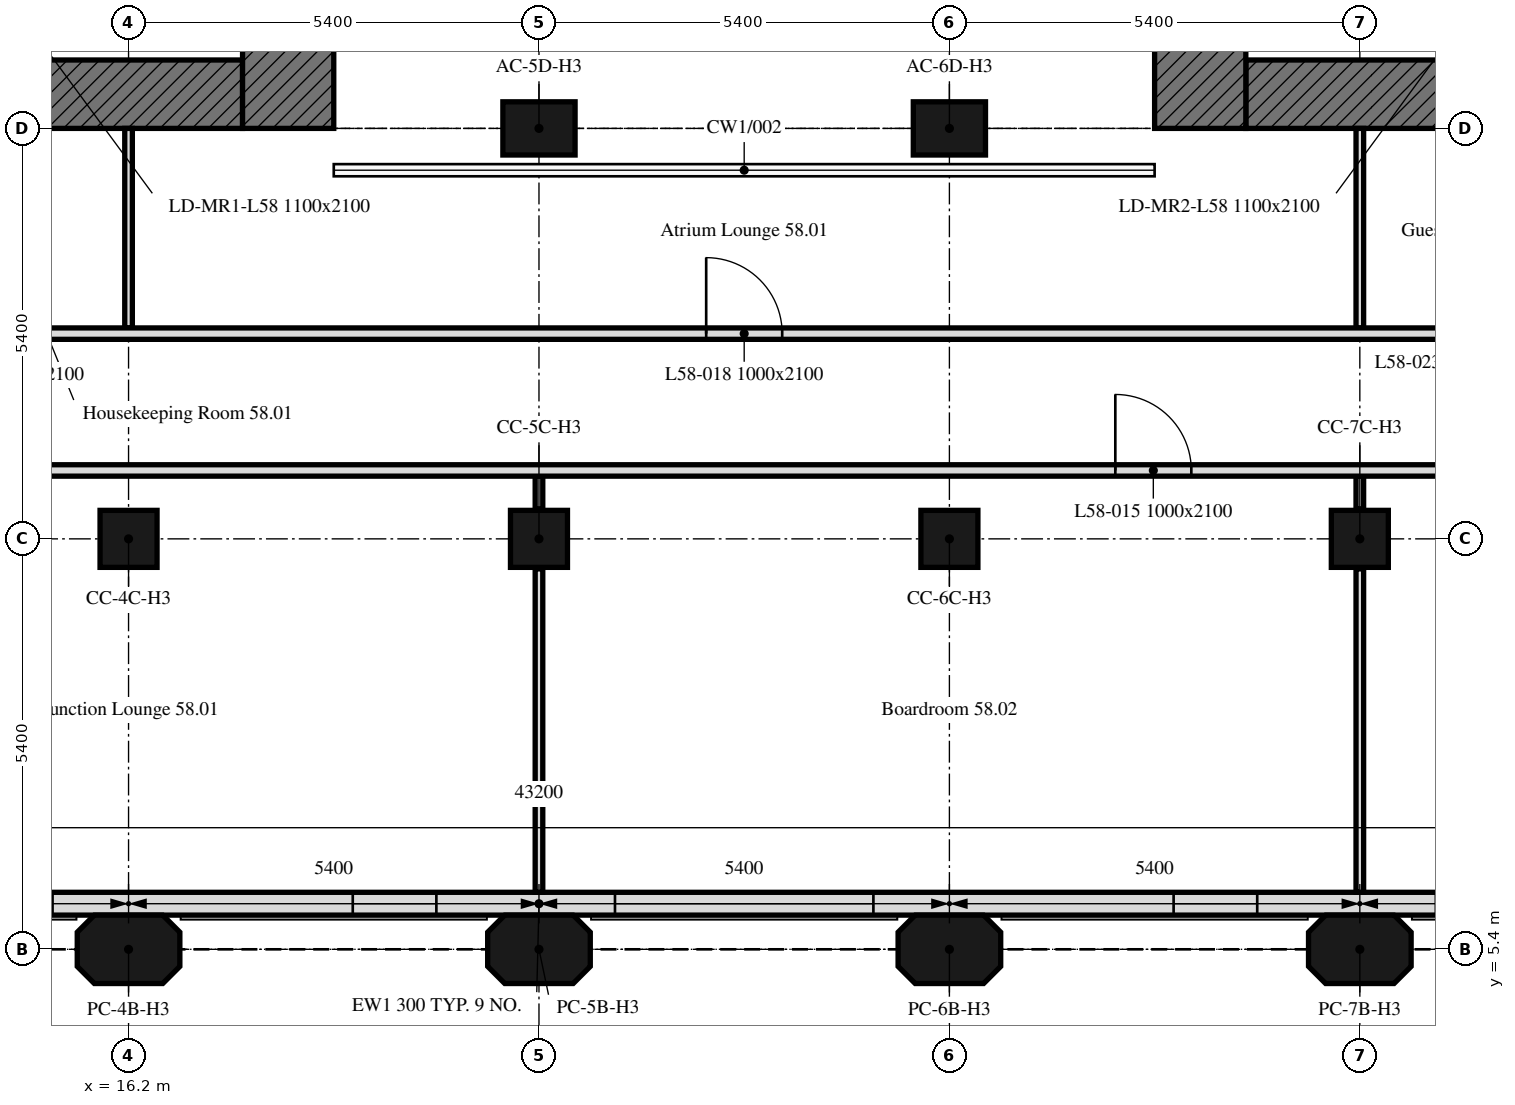
"""IFC4 building model, lengths in metres.
Left out: names, types, materials, properties, quantities, classifications, styles, units other than length and angle.
Written with IfcOpenShell. Run it as: python <this file> out.ifc"""

import sys

from ifc_helpers import new_model, si_unit, direction, frame, frame_2d, origin, origin_2d, place, context, subcontext, project, spatial, polyline, rectangle, outline, extrude, element, fill, save


model = new_model("IFC4")
c1 = context("Model", 3, precision=1e-05, world=origin(), true_north=direction((0.0, 1.0)))
c2 = subcontext(c1, "Body", "Model", "MODEL_VIEW")
j1 = project(units=[si_unit("LENGTHUNIT", "METRE"), si_unit("PLANEANGLEUNIT", "RADIAN")], contexts=[c1])
p1 = place(None, origin())
s1 = spatial("IfcSite", under=j1, at=p1, CompositionType="ELEMENT")
p2 = place(p1, origin())
s2 = spatial("IfcBuilding", under=s1, at=p2, CompositionType="ELEMENT")
p3 = place(p2, frame((0.0, 0.0, 230.2)))
s3 = spatial("IfcBuildingStorey", under=s2, at=p3, CompositionType="ELEMENT", Elevation=230.2)
for number, where, z_axis, x_axis in (
    (1, (16.2, 5.4, 0.0), (0.0, 0.0, 1.0), (1.0, 0.0, 0.0)),
    (2, (21.6, 5.4, 0.0), (0.0, 0.0, 1.0), (1.0, 0.0, 0.0)),
    (3, (27.0, 5.4, 0.0), (0.0, 0.0, 1.0), (1.0, 0.0, 0.0)),
    (4, (32.4, 5.4, 0.0), (0.0, 0.0, 1.0), (1.0, 0.0, 0.0)),
):
    element("IfcColumn", number, at=place(p3, frame(where, z_axis=z_axis, x_axis=x_axis)), inside=s3, PredefinedType="COLUMN", context=c2, shape_type="SweptSolid", body=[
        extrude(outline(polyline([(-0.45, -0.45), (0.45, -0.45), (0.675, -0.225), (0.675, 0.225), (0.45, 0.45), (-0.45, 0.45), (-0.675, 0.225), (-0.675, -0.225), (-0.45, -0.45)])), origin(), (0.0, 0.0, 1.0), 2.8),
    ])
for number, where, z_axis, x_axis in (
    (5, (16.2, 10.8, 0.0), (0.0, 0.0, 1.0), (1.0, 0.0, 0.0)),
    (6, (21.6, 10.8, 0.0), (0.0, 0.0, 1.0), (1.0, 0.0, 0.0)),
    (7, (27.0, 10.8, 0.0), (0.0, 0.0, 1.0), (1.0, 0.0, 0.0)),
    (8, (32.4, 10.8, 0.0), (0.0, 0.0, 1.0), (1.0, 0.0, 0.0)),
):
    element("IfcColumn", number, at=place(p3, frame(where, z_axis=z_axis, x_axis=x_axis)), inside=s3, PredefinedType="COLUMN", context=c2, shape_type="SweptSolid", body=[
        extrude(rectangle(XDim=0.75, YDim=0.75, at=origin_2d()), origin(), (0.0, 0.0, 1.0), 2.8),
    ])
for number, where, z_axis, x_axis in (
    (9, (21.6, 16.2, 0.0), (0.0, 0.0, 1.0), (1.0, 0.0, 0.0)),
    (10, (27.0, 16.2, 0.0), (0.0, 0.0, 1.0), (1.0, 0.0, 0.0)),
):
    element("IfcColumn", number, at=place(p3, frame(where, z_axis=z_axis, x_axis=x_axis)), inside=s3, PredefinedType="COLUMN", context=c2, shape_type="SweptSolid", body=[
        extrude(rectangle(XDim=0.95, YDim=0.7, at=origin_2d()), origin(), (0.0, 0.0, 1.0), 2.8),
    ])
p4 = place(p3, frame((5.586, 6.0, 0.0), z_axis=(0.0, 0.0, 1.0), x_axis=(1.0, 0.0, 0.0)))
e11 = element("IfcWall", 11, at=p4, inside=s3, PredefinedType="SOLIDWALL", context=c2, shape_type="SweptSolid", body=[
    extrude(rectangle(XDim=32.027, YDim=0.3, at=frame_2d((16.014, 0.0))), origin(), (0.0, 0.0, 1.0), 2.8),
])
p5 = place(p4, frame((2.764, 0.0, 0.9)))
e12 = element("IfcOpeningElement", 12, at=p5, cuts=e11, PredefinedType="OPENING", context=c2, shape_type="SweptSolid", body=[
    extrude(rectangle(XDim=1.1, YDim=1.7, at=frame_2d((0.55, 0.85))), frame((0.0, 0.16, 0.0), z_axis=(0.0, -1.0, 0.0), x_axis=(1.0, 0.0, 0.0)), (0.0, 0.0, 1.0), 0.32),
])
p6 = place(p4, frame((6.214, 0.0, 0.9)))
e13 = element("IfcOpeningElement", 13, at=p6, cuts=e11, PredefinedType="OPENING", context=c2, shape_type="SweptSolid", body=[
    extrude(rectangle(XDim=3.4, YDim=1.7, at=frame_2d((1.7, 0.85))), frame((0.0, 0.16, 0.0), z_axis=(0.0, -1.0, 0.0), x_axis=(1.0, 0.0, 0.0)), (0.0, 0.0, 1.0), 0.32),
])
p7 = place(p4, frame((13.564, 0.0, 0.9)))
e14 = element("IfcOpeningElement", 14, at=p7, cuts=e11, PredefinedType="OPENING", context=c2, shape_type="SweptSolid", body=[
    extrude(rectangle(XDim=1.1, YDim=1.7, at=frame_2d((0.55, 0.85))), frame((0.0, 0.16, 0.0), z_axis=(0.0, -1.0, 0.0), x_axis=(1.0, 0.0, 0.0)), (0.0, 0.0, 1.0), 0.32),
])
p8 = place(p4, frame((17.014, 0.0, 0.9)))
e15 = element("IfcOpeningElement", 15, at=p8, cuts=e11, PredefinedType="OPENING", context=c2, shape_type="SweptSolid", body=[
    extrude(rectangle(XDim=3.4, YDim=1.7, at=frame_2d((1.7, 0.85))), frame((0.0, 0.16, 0.0), z_axis=(0.0, -1.0, 0.0), x_axis=(1.0, 0.0, 0.0)), (0.0, 0.0, 1.0), 0.32),
])
p9 = place(p4, frame((24.364, 0.0, 0.9)))
e16 = element("IfcOpeningElement", 16, at=p9, cuts=e11, PredefinedType="OPENING", context=c2, shape_type="SweptSolid", body=[
    extrude(rectangle(XDim=1.1, YDim=1.7, at=frame_2d((0.55, 0.85))), frame((0.0, 0.16, 0.0), z_axis=(0.0, -1.0, 0.0), x_axis=(1.0, 0.0, 0.0)), (0.0, 0.0, 1.0), 0.32),
])
p10 = place(p4, frame((27.814, 0.0, 0.9)))
e17 = element("IfcOpeningElement", 17, at=p10, cuts=e11, PredefinedType="OPENING", context=c2, shape_type="SweptSolid", body=[
    extrude(rectangle(XDim=3.4, YDim=1.7, at=frame_2d((1.7, 0.85))), frame((0.0, 0.16, 0.0), z_axis=(0.0, -1.0, 0.0), x_axis=(1.0, 0.0, 0.0)), (0.0, 0.0, 1.0), 0.32),
])
p11 = place(p3, frame((17.7, 16.65, 0.0), z_axis=(0.0, 0.0, 1.0), x_axis=(-1.0, 0.0, 0.0)))
e18 = element("IfcWall", 18, at=p11, inside=s3, PredefinedType="SOLIDWALL", context=c2, shape_type="SweptSolid", body=[
    extrude(rectangle(XDim=11.1, YDim=0.9, at=frame_2d((5.55, 0.0))), origin(), (0.0, 0.0, 1.0), 2.8),
])
p12 = place(p11, frame((5.55, 0.0, 0.0)))
e19 = element("IfcOpeningElement", 19, at=p12, cuts=e18, PredefinedType="OPENING", context=c2, shape_type="SweptSolid", body=[
    extrude(rectangle(XDim=2.0, YDim=2.4, at=frame_2d((1.0, 1.2))), frame((0.0, 0.45, 0.0), z_axis=(0.0, -1.0, 0.0), x_axis=(1.0, 0.0, 0.0)), (0.0, 0.0, 1.0), 0.9),
])
p13 = place(p3, frame((18.3, 32.4, 0.0), z_axis=(0.0, 0.0, 1.0), x_axis=(0.0, -1.0, 0.0)))
e20 = element("IfcWall", 20, at=p13, inside=s3, PredefinedType="SOLIDWALL", context=c2, shape_type="SweptSolid", body=[
    extrude(rectangle(XDim=16.2, YDim=1.2, at=frame_2d((8.1, 0.0))), origin(), (0.0, 0.0, 1.0), 2.8),
])
p14 = place(p3, frame((42.0, 16.65, 0.0), z_axis=(0.0, 0.0, 1.0), x_axis=(-1.0, 0.0, 0.0)))
e21 = element("IfcWall", 21, at=p14, inside=s3, PredefinedType="SOLIDWALL", context=c2, shape_type="SweptSolid", body=[
    extrude(rectangle(XDim=11.1, YDim=0.9, at=frame_2d((5.55, 0.0))), origin(), (0.0, 0.0, 1.0), 2.8),
])
p15 = place(p14, frame((3.55, 0.0, 0.0)))
e22 = element("IfcOpeningElement", 22, at=p15, cuts=e21, PredefinedType="OPENING", context=c2, shape_type="SweptSolid", body=[
    extrude(rectangle(XDim=2.0, YDim=2.4, at=frame_2d((1.0, 1.2))), frame((0.0, 0.45, 0.0), z_axis=(0.0, -1.0, 0.0), x_axis=(1.0, 0.0, 0.0)), (0.0, 0.0, 1.0), 0.9),
])
p16 = place(p3, frame((30.3, 16.2, 0.0), z_axis=(0.0, 0.0, 1.0), x_axis=(0.0, 1.0, 0.0)))
e23 = element("IfcWall", 23, at=p16, inside=s3, PredefinedType="SOLIDWALL", context=c2, shape_type="SweptSolid", body=[
    extrude(rectangle(XDim=16.2, YDim=1.2, at=frame_2d((8.1, 0.0))), origin(), (0.0, 0.0, 1.0), 2.8),
])
p17 = place(p3, frame((32.4, 11.625, 0.0), z_axis=(0.0, 0.0, 1.0), x_axis=(0.0, -1.0, 0.0)))
e24 = element("IfcWall", 24, at=p17, inside=s3, PredefinedType="PARTITIONING", context=c2, shape_type="SweptSolid", body=[
    extrude(rectangle(XDim=0.43, YDim=0.1, at=frame_2d((0.215, 0.0))), origin(), (0.0, 0.0, 1.0), 2.2),
])
p18 = place(p3, frame((32.4, 10.405, 0.0), z_axis=(0.0, 0.0, 1.0), x_axis=(0.0, -1.0, 0.0)))
e25 = element("IfcWall", 25, at=p18, inside=s3, PredefinedType="PARTITIONING", context=c2, shape_type="SweptSolid", body=[
    extrude(rectangle(XDim=4.254, YDim=0.1, at=frame_2d((2.127, 0.0))), origin(), (0.0, 0.0, 1.0), 2.2),
])
p19 = place(p3, frame((21.6, 11.625, 0.0), z_axis=(0.0, 0.0, 1.0), x_axis=(0.0, -1.0, 0.0)))
e26 = element("IfcWall", 26, at=p19, inside=s3, PredefinedType="PARTITIONING", context=c2, shape_type="SweptSolid", body=[
    extrude(rectangle(XDim=0.43, YDim=0.1, at=frame_2d((0.215, 0.0))), origin(), (0.0, 0.0, 1.0), 2.2),
])
p20 = place(p3, frame((21.6, 10.405, 0.0), z_axis=(0.0, 0.0, 1.0), x_axis=(0.0, -1.0, 0.0)))
e27 = element("IfcWall", 27, at=p20, inside=s3, PredefinedType="PARTITIONING", context=c2, shape_type="SweptSolid", body=[
    extrude(rectangle(XDim=4.254, YDim=0.1, at=frame_2d((2.127, 0.0))), origin(), (0.0, 0.0, 1.0), 2.2),
])
p21 = place(p3, frame((0.751, 11.7, 0.0), z_axis=(0.0, 0.0, 1.0), x_axis=(1.0, 0.0, 0.0)))
e28 = element("IfcWall", 28, at=p21, inside=s3, PredefinedType="PARTITIONING", context=c2, shape_type="SweptSolid", body=[
    extrude(rectangle(XDim=41.698, YDim=0.15, at=frame_2d((20.849, 0.0))), origin(), (0.0, 0.0, 1.0), 2.2),
])
p22 = place(p21, frame((33.866, 0.0, 0.0)))
e29 = element("IfcOpeningElement", 29, at=p22, cuts=e28, PredefinedType="OPENING", context=c2, shape_type="SweptSolid", body=[
    extrude(rectangle(XDim=1.0, YDim=2.1, at=frame_2d((0.5, 1.05))), frame((0.0, 0.075, 0.0), z_axis=(0.0, -1.0, 0.0), x_axis=(1.0, 0.0, 0.0)), (0.0, 0.0, 1.0), 0.15),
])
p23 = place(p21, frame((28.432, 0.0, 0.0)))
e30 = element("IfcOpeningElement", 30, at=p23, cuts=e28, PredefinedType="OPENING", context=c2, shape_type="SweptSolid", body=[
    extrude(rectangle(XDim=1.0, YDim=2.1, at=frame_2d((0.5, 1.05))), frame((0.0, 0.075, 0.0), z_axis=(0.0, -1.0, 0.0), x_axis=(1.0, 0.0, 0.0)), (0.0, 0.0, 1.0), 0.15),
])
p24 = place(p21, frame((12.266, 0.0, 0.0)))
e31 = element("IfcOpeningElement", 31, at=p24, cuts=e28, PredefinedType="OPENING", context=c2, shape_type="SweptSolid", body=[
    extrude(rectangle(XDim=1.0, YDim=2.1, at=frame_2d((0.5, 1.05))), frame((0.0, 0.075, 0.0), z_axis=(0.0, -1.0, 0.0), x_axis=(1.0, 0.0, 0.0)), (0.0, 0.0, 1.0), 0.15),
])
p25 = place(p21, frame((2.744, 0.0, 0.0)))
e32 = element("IfcOpeningElement", 32, at=p25, cuts=e28, PredefinedType="OPENING", context=c2, shape_type="SweptSolid", body=[
    extrude(rectangle(XDim=1.0, YDim=2.1, at=frame_2d((0.5, 1.05))), frame((0.0, 0.075, 0.0), z_axis=(0.0, -1.0, 0.0), x_axis=(1.0, 0.0, 0.0)), (0.0, 0.0, 1.0), 0.15),
])
for number, where, z_axis, x_axis in (
    (33, (32.4, 13.575, 0.0), (0.0, 0.0, 1.0), (0.0, 1.0, 0.0)),
    (34, (16.2, 16.2, 0.0), (0.0, 0.0, 1.0), (0.0, -1.0, 0.0)),
):
    element("IfcWall", number, at=place(p3, frame(where, z_axis=z_axis, x_axis=x_axis)), inside=s3, PredefinedType="PARTITIONING", context=c2, shape_type="SweptSolid", body=[
        extrude(rectangle(XDim=2.625, YDim=0.1, at=frame_2d((1.312, 0.0))), origin(), (0.0, 0.0, 1.0), 2.2),
    ])
p26 = place(p3, frame((5.325, 13.5, 0.0), z_axis=(0.0, 0.0, 1.0), x_axis=(1.0, 0.0, 0.0)))
e35 = element("IfcWall", 35, at=p26, inside=s3, PredefinedType="PARTITIONING", context=c2, shape_type="SweptSolid", body=[
    extrude(rectangle(XDim=37.124, YDim=0.15, at=frame_2d((18.562, 0.0))), origin(), (0.0, 0.0, 1.0), 2.2),
])
p27 = place(p26, frame((18.475, 0.0, 0.0)))
e36 = element("IfcOpeningElement", 36, at=p27, cuts=e35, PredefinedType="OPENING", context=c2, shape_type="SweptSolid", body=[
    extrude(rectangle(XDim=1.0, YDim=2.1, at=frame_2d((0.5, 1.05))), frame((0.0, 0.075, 0.0), z_axis=(0.0, -1.0, 0.0), x_axis=(1.0, 0.0, 0.0)), (0.0, 0.0, 1.0), 0.15),
])
p28 = place(p26, frame((34.095, 0.0, 0.0)))
e37 = element("IfcOpeningElement", 37, at=p28, cuts=e35, PredefinedType="OPENING", context=c2, shape_type="SweptSolid", body=[
    extrude(rectangle(XDim=1.0, YDim=2.1, at=frame_2d((0.5, 1.05))), frame((0.0, 0.075, 0.0), z_axis=(0.0, -1.0, 0.0), x_axis=(1.0, 0.0, 0.0)), (0.0, 0.0, 1.0), 0.15),
])
p29 = place(p26, frame((8.75, 0.0, 0.0)))
e38 = element("IfcOpeningElement", 38, at=p29, cuts=e35, PredefinedType="OPENING", context=c2, shape_type="SweptSolid", body=[
    extrude(rectangle(XDim=1.0, YDim=2.1, at=frame_2d((0.5, 1.05))), frame((0.0, 0.075, 0.0), z_axis=(0.0, -1.0, 0.0), x_axis=(1.0, 0.0, 0.0)), (0.0, 0.0, 1.0), 0.15),
])
p30 = place(p26, frame((1.55, 0.0, 0.0)))
e39 = element("IfcOpeningElement", 39, at=p30, cuts=e35, PredefinedType="OPENING", context=c2, shape_type="SweptSolid", body=[
    extrude(rectangle(XDim=1.0, YDim=2.1, at=frame_2d((0.5, 1.05))), frame((0.0, 0.075, 0.0), z_axis=(0.0, -1.0, 0.0), x_axis=(1.0, 0.0, 0.0)), (0.0, 0.0, 1.0), 0.15),
])
p31 = place(p26, frame((28.2, 0.0, 0.0)))
e40 = element("IfcOpeningElement", 40, at=p31, cuts=e35, PredefinedType="OPENING", context=c2, shape_type="SweptSolid", body=[
    extrude(rectangle(XDim=1.0, YDim=2.1, at=frame_2d((0.5, 1.05))), frame((0.0, 0.075, 0.0), z_axis=(0.0, -1.0, 0.0), x_axis=(1.0, 0.0, 0.0)), (0.0, 0.0, 1.0), 0.15),
])
p32 = place(p26, frame((30.625, 0.0, 0.0)))
e41 = element("IfcOpeningElement", 41, at=p32, cuts=e35, PredefinedType="OPENING", context=c2, shape_type="SweptSolid", body=[
    extrude(rectangle(XDim=1.8, YDim=2.4, at=frame_2d((0.9, 1.2))), frame((0.0, 0.075, 0.0), z_axis=(0.0, -1.0, 0.0), x_axis=(1.0, 0.0, 0.0)), (0.0, 0.0, 1.0), 0.15),
])
p33 = place(p26, frame((5.925, 0.0, 0.0)))
e42 = element("IfcOpeningElement", 42, at=p33, cuts=e35, PredefinedType="OPENING", context=c2, shape_type="SweptSolid", body=[
    extrude(rectangle(XDim=1.0, YDim=2.1, at=frame_2d((0.5, 1.05))), frame((0.0, 0.075, 0.0), z_axis=(0.0, -1.0, 0.0), x_axis=(1.0, 0.0, 0.0)), (0.0, 0.0, 1.0), 0.15),
])
p34 = place(p7, origin())
e43 = element("IfcWindow", 43, at=p34, inside=s3, PartitioningType="SINGLE_PANEL", PredefinedType="WINDOW", context=c2, shape_type="SweptSolid", body=[
    extrude(rectangle(XDim=1.1, YDim=1.7, at=frame_2d((0.55, 0.85))), frame((0.0, 0.03, 0.0), z_axis=(0.0, -1.0, 0.0), x_axis=(1.0, 0.0, 0.0)), (0.0, 0.0, 1.0), 0.06),
])
fill(e14, e43)
p35 = place(p8, origin())
e44 = element("IfcWindow", 44, at=p35, inside=s3, PartitioningType="SINGLE_PANEL", PredefinedType="WINDOW", context=c2, shape_type="SweptSolid", body=[
    extrude(rectangle(XDim=3.4, YDim=1.7, at=frame_2d((1.7, 0.85))), frame((0.0, 0.03, 0.0), z_axis=(0.0, -1.0, 0.0), x_axis=(1.0, 0.0, 0.0)), (0.0, 0.0, 1.0), 0.06),
])
fill(e15, e44)
p36 = place(p9, origin())
e45 = element("IfcWindow", 45, at=p36, inside=s3, PartitioningType="SINGLE_PANEL", PredefinedType="WINDOW", context=c2, shape_type="SweptSolid", body=[
    extrude(rectangle(XDim=1.1, YDim=1.7, at=frame_2d((0.55, 0.85))), frame((0.0, 0.03, 0.0), z_axis=(0.0, -1.0, 0.0), x_axis=(1.0, 0.0, 0.0)), (0.0, 0.0, 1.0), 0.06),
])
fill(e16, e45)
p37 = place(p23, origin())
e46 = element("IfcDoor", 46, at=p37, inside=s3, OperationType="SINGLE_SWING_LEFT", PredefinedType="DOOR", context=c2, shape_type="SweptSolid", body=[
    extrude(rectangle(XDim=1.0, YDim=2.1, at=frame_2d((0.5, 1.05))), frame((0.0, 0.025, 0.0), z_axis=(0.0, -1.0, 0.0), x_axis=(1.0, 0.0, 0.0)), (0.0, 0.0, 1.0), 0.05),
])
fill(e30, e46)
p38 = place(p27, origin())
e47 = element("IfcDoor", 47, at=p38, inside=s3, OperationType="SINGLE_SWING_RIGHT", PredefinedType="DOOR", context=c2, shape_type="SweptSolid", body=[
    extrude(rectangle(XDim=1.0, YDim=2.1, at=frame_2d((0.5, 1.05))), frame((0.0, 0.025, 0.0), z_axis=(0.0, -1.0, 0.0), x_axis=(1.0, 0.0, 0.0)), (0.0, 0.0, 1.0), 0.05),
])
fill(e36, e47)
save(model, sys.argv[1])
